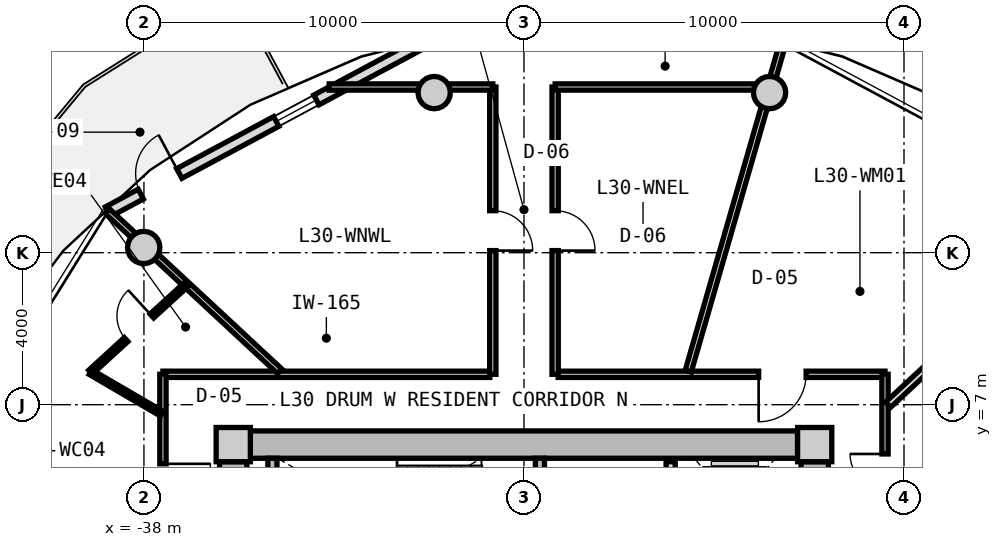
"""IFC4 building model, lengths in metres.
Left out: names, types, materials, properties, quantities, classifications, styles, units other than length and angle.
Written with IfcOpenShell. Run it as: python <this file> out.ifc"""

import sys

from ifc_helpers import new_model, si_unit, direction, frame, frame_2d, origin, origin_2d, place, context, subcontext, project, spatial, rectangle, circle, extrude, source, transform, mapped, element, fill, save


model = new_model("IFC4")
c1 = context("Model", 3, precision=1e-05, world=origin(), true_north=direction((0.0, 1.0)))
c2 = subcontext(c1, "Body", "Model", "MODEL_VIEW")
j1 = project(units=[si_unit("LENGTHUNIT", "METRE"), si_unit("PLANEANGLEUNIT", "RADIAN")], contexts=[c1])
p1 = place(None, origin())
s1 = spatial("IfcSite", under=j1, at=p1, CompositionType="ELEMENT")
p2 = place(p1, origin())
s2 = spatial("IfcBuilding", under=s1, at=p2, CompositionType="ELEMENT")
p3 = place(p2, frame((0.0, 0.0, 99.3)))
s3 = spatial("IfcBuildingStorey", under=s2, at=p3, CompositionType="ELEMENT", Elevation=99.3)
m1 = source(origin(), c2, "Body", "SweptSolid", [
    extrude(rectangle(XDim=0.9, YDim=0.9, at=origin_2d()), origin(), (0.0, 0.0, 1.0), 3.05),
])
for number, where, z_axis, x_axis in (
    (1, (-20.35, 5.95, 0.0), (0.0, 0.0, 1.0), (1.0, 0.0, 0.0)),
    (2, (-35.65, 5.95, 0.0), (0.0, 0.0, 1.0), (1.0, 0.0, 0.0)),
):
    element("IfcColumn", number, at=place(p3, frame(where, z_axis=z_axis, x_axis=x_axis)), inside=s3, PredefinedType="COLUMN", context=c2, shape_type="MappedRepresentation", body=[
        mapped(m1, transform((0.0, 0.0, 0.0), x_axis=(1.0, 0.0, 0.0), y_axis=(0.0, 1.0, 0.0), z_axis=(0.0, 0.0, 1.0), scale=1.0)),
    ])
m2 = source(origin(), c2, "Body", "SweptSolid", [
    extrude(rectangle(XDim=14.4, YDim=0.72, at=frame_2d((7.2, 0.0))), origin(), (0.0, 0.0, 1.0), 2.79),
])
p4 = place(p3, frame((-35.2, 5.95, 0.0), z_axis=(0.0, 0.0, 1.0), x_axis=(1.0, 0.0, 0.0)))
e3 = element("IfcWall", 3, at=p4, inside=s3, PredefinedType="SHEAR", context=c2, shape_type="MappedRepresentation", body=[
    mapped(m2, transform((0.0, 0.0, 0.0), x_axis=(1.0, 0.0, 0.0), y_axis=(0.0, 1.0, 0.0), z_axis=(0.0, 0.0, 1.0), scale=1.0)),
])
m3 = source(origin(), c2, "Body", "SweptSolid", [
    extrude(rectangle(XDim=11.0, YDim=0.72, at=frame_2d((5.5, 0.0))), origin(), (0.0, 0.0, 1.0), 2.79),
])
p5 = place(p3, frame((-35.65, -5.5, 0.0), z_axis=(0.0, 0.0, 1.0), x_axis=(0.0, 1.0, 0.0)))
e4 = element("IfcWall", 4, at=p5, inside=s3, PredefinedType="SHEAR", context=c2, shape_type="MappedRepresentation", body=[
    mapped(m3, transform((0.0, 0.0, 0.0), x_axis=(1.0, 0.0, 0.0), y_axis=(0.0, 1.0, 0.0), z_axis=(0.0, 0.0, 1.0), scale=1.0)),
])
p6 = place(p5, frame((3.8, 0.0, 0.0)))
e5 = element("IfcOpeningElement", 5, at=p6, cuts=e4, PredefinedType="OPENING", context=c2, shape_type="SweptSolid", body=[
    extrude(rectangle(XDim=1.2, YDim=2.15, at=frame_2d((0.6, 1.075))), frame((0.0, 0.37, 0.0), z_axis=(0.0, -1.0, 0.0), x_axis=(1.0, 0.0, 0.0)), (0.0, 0.0, 1.0), 0.74),
])
p7 = place(p3, frame((-20.35, 5.5, 0.0), z_axis=(0.0, 0.0, 1.0), x_axis=(0.0, -1.0, 0.0)))
e6 = element("IfcWall", 6, at=p7, inside=s3, PredefinedType="SHEAR", context=c2, shape_type="MappedRepresentation", body=[
    mapped(m3, transform((0.0, 0.0, 0.0), x_axis=(1.0, 0.0, 0.0), y_axis=(0.0, 1.0, 0.0), z_axis=(0.0, 0.0, 1.0), scale=1.0)),
])
p8 = place(p7, frame((5.65, 0.0, 0.0)))
e7 = element("IfcOpeningElement", 7, at=p8, cuts=e6, PredefinedType="OPENING", context=c2, shape_type="SweptSolid", body=[
    extrude(rectangle(XDim=1.2, YDim=2.15, at=frame_2d((0.6, 1.075))), frame((0.0, 0.37, 0.0), z_axis=(0.0, -1.0, 0.0), x_axis=(1.0, 0.0, 0.0)), (0.0, 0.0, 1.0), 0.74),
])
m4 = source(origin(), c2, "Body", "SweptSolid", [
    extrude(circle(Radius=0.425, at=origin_2d()), origin(), (0.0, 0.0, 1.0), 3.05),
])
for number, where, z_axis, x_axis in (
    (8, (-21.537, 15.213, 0.0), (0.0, 0.0, 1.0), (1.0, 0.0, 0.0)),
    (9, (-30.363, 15.213, 0.0), (0.0, 0.0, 1.0), (1.0, 0.0, 0.0)),
    (10, (-38.006, 11.137, 0.0), (0.0, 0.0, 1.0), (1.0, 0.0, 0.0)),
):
    element("IfcColumn", number, at=place(p3, frame(where, z_axis=z_axis, x_axis=x_axis)), inside=s3, PredefinedType="COLUMN", context=c2, shape_type="MappedRepresentation", body=[
        mapped(m4, transform((0.0, 0.0, 0.0), x_axis=(1.0, 0.0, 0.0), y_axis=(0.0, 1.0, 0.0), z_axis=(0.0, 0.0, 1.0), scale=1.0)),
    ])
m5 = source(origin(), c2, "Body", "SweptSolid", [
    extrude(rectangle(XDim=9.351, YDim=0.29, at=frame_2d((4.675, 0.0))), origin(), (0.0, 0.0, 1.0), 2.79),
])
p9 = place(p3, frame((-38.947, 12.077, 0.0), z_axis=(0.0, 0.0, 1.0), x_axis=(0.881184411073, 0.472772708267, 0.0)))
e11 = element("IfcWall", 11, at=p9, inside=s3, PredefinedType="SOLIDWALL", context=c2, shape_type="MappedRepresentation", body=[
    mapped(m5, transform((0.0, 0.0, 0.0), x_axis=(1.0, 0.0, 0.0), y_axis=(0.0, 1.0, 0.0), z_axis=(0.0, 0.0, 1.0), scale=1.0)),
])
p10 = place(p9, frame((0.98, 0.0, 0.0)))
e12 = element("IfcOpeningElement", 12, at=p10, cuts=e11, PredefinedType="OPENING", context=c2, shape_type="SweptSolid", body=[
    extrude(rectangle(XDim=1.15, YDim=2.25, at=frame_2d((0.575, 1.125))), frame((0.0, 0.155, 0.0), z_axis=(0.0, -1.0, 0.0), x_axis=(1.0, 0.0, 0.0)), (0.0, 0.0, 1.0), 0.31),
])
p11 = place(p9, frame((5.025, 0.0, 0.85)))
e13 = element("IfcOpeningElement", 13, at=p11, cuts=e11, PredefinedType="OPENING", context=c2, shape_type="SweptSolid", body=[
    extrude(rectangle(XDim=1.2, YDim=1.5, at=frame_2d((0.6, 0.75))), frame((0.0, 0.155, 0.0), z_axis=(0.0, -1.0, 0.0), x_axis=(1.0, 0.0, 0.0)), (0.0, 0.0, 1.0), 0.31),
])
m6 = source(origin(), c2, "Body", "SweptSolid", [
    extrude(rectangle(XDim=3.14, YDim=0.24, at=frame_2d((1.57, 0.0))), origin(), (0.0, 0.0, 1.0), 2.79),
])
p12 = place(p3, frame((-34.62, 2.45, 0.0), z_axis=(0.0, 0.0, 1.0), x_axis=(0.0, 1.0, 0.0)))
e14 = element("IfcWall", 14, at=p12, inside=s3, PredefinedType="PARTITIONING", context=c2, shape_type="MappedRepresentation", body=[
    mapped(m6, transform((0.0, 0.0, 0.0), x_axis=(1.0, 0.0, 0.0), y_axis=(0.0, 1.0, 0.0), z_axis=(0.0, 0.0, 1.0), scale=1.0)),
])
p13 = place(p3, frame((-27.58, 2.45, 0.0), z_axis=(0.0, 0.0, 1.0), x_axis=(0.0, 1.0, 0.0)))
e15 = element("IfcWall", 15, at=p13, inside=s3, PredefinedType="PARTITIONING", context=c2, shape_type="MappedRepresentation", body=[
    mapped(m6, transform((0.0, 0.0, 0.0), x_axis=(1.0, 0.0, 0.0), y_axis=(0.0, 1.0, 0.0), z_axis=(0.0, 0.0, 1.0), scale=1.0)),
])
p14 = place(p13, frame((0.55, 0.0, 0.0)))
e16 = element("IfcOpeningElement", 16, at=p14, cuts=e15, PredefinedType="OPENING", context=c2, shape_type="SweptSolid", body=[
    extrude(rectangle(XDim=1.1, YDim=2.15, at=frame_2d((0.55, 1.075))), frame((0.0, 0.13, 0.0), z_axis=(0.0, -1.0, 0.0), x_axis=(1.0, 0.0, 0.0)), (0.0, 0.0, 1.0), 0.26),
])
m7 = source(origin(), c2, "Body", "SweptSolid", [
    extrude(rectangle(XDim=5.0, YDim=0.24, at=frame_2d((2.5, 0.0))), origin(), (0.0, 0.0, 1.0), 2.775),
])
p15 = place(p3, frame((-24.14, 0.5, 0.0), z_axis=(0.0, 0.0, 1.0), x_axis=(0.0, 1.0, 0.0)))
e17 = element("IfcWall", 17, at=p15, inside=s3, PredefinedType="PARTITIONING", context=c2, shape_type="MappedRepresentation", body=[
    mapped(m7, transform((0.0, 0.0, 0.0), x_axis=(1.0, 0.0, 0.0), y_axis=(0.0, 1.0, 0.0), z_axis=(0.0, 0.0, 1.0), scale=1.0)),
])
p16 = place(p15, frame((3.05, 0.0, 0.0)))
e18 = element("IfcOpeningElement", 18, at=p16, cuts=e17, PredefinedType="OPENING", context=c2, shape_type="SweptSolid", body=[
    extrude(rectangle(XDim=1.3, YDim=2.2, at=frame_2d((0.65, 1.1))), frame((0.0, 0.13, 0.0), z_axis=(0.0, -1.0, 0.0), x_axis=(1.0, 0.0, 0.0)), (0.0, 0.0, 1.0), 0.26),
])
p17 = place(p15, frame((0.55, 0.0, 0.0)))
e19 = element("IfcOpeningElement", 19, at=p17, cuts=e17, PredefinedType="OPENING", context=c2, shape_type="SweptSolid", body=[
    extrude(rectangle(XDim=1.3, YDim=2.2, at=frame_2d((0.65, 1.1))), frame((0.0, 0.13, 0.0), z_axis=(0.0, -1.0, 0.0), x_axis=(1.0, 0.0, 0.0)), (0.0, 0.0, 1.0), 0.26),
])
m8 = source(origin(), c2, "Body", "SweptSolid", [
    extrude(rectangle(XDim=8.6, YDim=0.165, at=frame_2d((4.3, 0.0))), origin(), (0.0, 0.0, 1.0), 2.775),
])
p18 = place(p3, frame((-37.5, 7.8, 0.0), z_axis=(0.0, 0.0, 1.0), x_axis=(1.0, 0.0, 0.0)))
e20 = element("IfcWall", 20, at=p18, inside=s3, PredefinedType="PARTITIONING", context=c2, shape_type="MappedRepresentation", body=[
    mapped(m8, transform((0.0, 0.0, 0.0), x_axis=(1.0, 0.0, 0.0), y_axis=(0.0, 1.0, 0.0), z_axis=(0.0, 0.0, 1.0), scale=1.0)),
])
p19 = place(p3, frame((-27.1, 7.8, 0.0), z_axis=(0.0, 0.0, 1.0), x_axis=(1.0, 0.0, 0.0)))
e21 = element("IfcWall", 21, at=p19, inside=s3, PredefinedType="PARTITIONING", context=c2, shape_type="MappedRepresentation", body=[
    mapped(m8, transform((0.0, 0.0, 0.0), x_axis=(1.0, 0.0, 0.0), y_axis=(0.0, 1.0, 0.0), z_axis=(0.0, 0.0, 1.0), scale=1.0)),
])
p20 = place(p19, frame((5.275, 0.0, 0.0)))
e22 = element("IfcOpeningElement", 22, at=p20, cuts=e21, PredefinedType="OPENING", context=c2, shape_type="SweptSolid", body=[
    extrude(rectangle(XDim=1.25, YDim=2.2, at=frame_2d((0.625, 1.1))), frame((0.0, 0.093, 0.0), z_axis=(0.0, -1.0, 0.0), x_axis=(1.0, 0.0, 0.0)), (0.0, 0.0, 1.0), 0.185),
])
m9 = source(origin(), c2, "Body", "SweptSolid", [
    extrude(rectangle(XDim=15.6, YDim=0.165, at=frame_2d((7.8, 0.0))), origin(), (0.0, 0.0, 1.0), 2.775),
])
p21 = place(p3, frame((-37.5, -7.8, 0.0), z_axis=(0.0, 0.0, 1.0), x_axis=(0.0, 1.0, 0.0)))
e23 = element("IfcWall", 23, at=p21, inside=s3, PredefinedType="PARTITIONING", context=c2, shape_type="MappedRepresentation", body=[
    mapped(m9, transform((0.0, 0.0, 0.0), x_axis=(1.0, 0.0, 0.0), y_axis=(0.0, 1.0, 0.0), z_axis=(0.0, 0.0, 1.0), scale=1.0)),
])
p22 = place(p21, frame((11.994, 0.0, 0.0)))
e24 = element("IfcOpeningElement", 24, at=p22, cuts=e23, PredefinedType="OPENING", context=c2, shape_type="SweptSolid", body=[
    extrude(rectangle(XDim=1.25, YDim=2.2, at=frame_2d((0.625, 1.1))), frame((0.0, 0.093, 0.0), z_axis=(0.0, -1.0, 0.0), x_axis=(1.0, 0.0, 0.0)), (0.0, 0.0, 1.0), 0.185),
])
p23 = place(p21, frame((4.867, 0.0, 0.0)))
e25 = element("IfcOpeningElement", 25, at=p23, cuts=e23, PredefinedType="OPENING", context=c2, shape_type="SweptSolid", body=[
    extrude(rectangle(XDim=1.25, YDim=2.2, at=frame_2d((0.625, 1.1))), frame((0.0, 0.093, 0.0), z_axis=(0.0, -1.0, 0.0), x_axis=(1.0, 0.0, 0.0)), (0.0, 0.0, 1.0), 0.185),
])
p24 = place(p3, frame((-18.5, 7.8, 0.0), z_axis=(0.0, 0.0, 1.0), x_axis=(0.0, -1.0, 0.0)))
e26 = element("IfcWall", 26, at=p24, inside=s3, PredefinedType="PARTITIONING", context=c2, shape_type="MappedRepresentation", body=[
    mapped(m9, transform((0.0, 0.0, 0.0), x_axis=(1.0, 0.0, 0.0), y_axis=(0.0, 1.0, 0.0), z_axis=(0.0, 0.0, 1.0), scale=1.0)),
])
p25 = place(p24, frame((9.734, 0.0, 0.0)))
e27 = element("IfcOpeningElement", 27, at=p25, cuts=e26, PredefinedType="OPENING", context=c2, shape_type="SweptSolid", body=[
    extrude(rectangle(XDim=1.25, YDim=2.2, at=frame_2d((0.625, 1.1))), frame((0.0, 0.093, 0.0), z_axis=(0.0, -1.0, 0.0), x_axis=(1.0, 0.0, 0.0)), (0.0, 0.0, 1.0), 0.185),
])
p26 = place(p24, frame((4.739, 0.0, 0.0)))
e28 = element("IfcOpeningElement", 28, at=p26, cuts=e26, PredefinedType="OPENING", context=c2, shape_type="SweptSolid", body=[
    extrude(rectangle(XDim=0.92, YDim=2.1, at=frame_2d((0.46, 1.05))), frame((0.0, 0.093, 0.0), z_axis=(0.0, -1.0, 0.0), x_axis=(1.0, 0.0, 0.0)), (0.0, 0.0, 1.0), 0.185),
])
p27 = place(p24, frame((2.096, 0.0, 0.0)))
e29 = element("IfcOpeningElement", 29, at=p27, cuts=e26, PredefinedType="OPENING", context=c2, shape_type="SweptSolid", body=[
    extrude(rectangle(XDim=0.92, YDim=2.1, at=frame_2d((0.46, 1.05))), frame((0.0, 0.093, 0.0), z_axis=(0.0, -1.0, 0.0), x_axis=(1.0, 0.0, 0.0)), (0.0, 0.0, 1.0), 0.185),
])
m10 = source(origin(), c2, "Body", "SweptSolid", [
    extrude(rectangle(XDim=8.989, YDim=0.165, at=frame_2d((4.495, 0.0))), origin(), (0.0, 0.0, 1.0), 2.275),
])
p28 = place(p3, frame((-23.678, 7.88, 0.0), z_axis=(0.0, 0.0, 1.0), x_axis=(0.27702323008, 0.960863221274, 0.0)))
e30 = element("IfcWall", 30, at=p28, inside=s3, PredefinedType="PARTITIONING", context=c2, shape_type="MappedRepresentation", body=[
    mapped(m10, transform((0.0, 0.0, 0.0), x_axis=(1.0, 0.0, 0.0), y_axis=(0.0, 1.0, 0.0), z_axis=(0.0, 0.0, 1.0), scale=1.0)),
])
m11 = source(origin(), c2, "Body", "SweptSolid", [
    extrude(rectangle(XDim=6.187, YDim=0.165, at=frame_2d((3.093, 0.0))), origin(), (0.0, 0.0, 1.0), 2.275),
])
p29 = place(p3, frame((-34.429, 7.88, 0.0), z_axis=(0.0, 0.0, 1.0), x_axis=(-0.732501077882, 0.680765870841, 0.0)))
e31 = element("IfcWall", 31, at=p29, inside=s3, PredefinedType="PARTITIONING", context=c2, shape_type="MappedRepresentation", body=[
    mapped(m11, transform((0.0, 0.0, 0.0), x_axis=(1.0, 0.0, 0.0), y_axis=(0.0, 1.0, 0.0), z_axis=(0.0, 0.0, 1.0), scale=1.0)),
])
m12 = source(origin(), c2, "Body", "SweptSolid", [
    extrude(rectangle(XDim=7.56, YDim=0.165, at=frame_2d((3.78, 0.0))), origin(), (0.0, 0.0, 1.0), 2.775),
])
p30 = place(p3, frame((-28.82, 7.8, 0.0), z_axis=(0.0, 0.0, 1.0), x_axis=(0.0, 1.0, 0.0)))
e32 = element("IfcWall", 32, at=p30, inside=s3, PredefinedType="PARTITIONING", context=c2, shape_type="MappedRepresentation", body=[
    mapped(m12, transform((0.0, 0.0, 0.0), x_axis=(1.0, 0.0, 0.0), y_axis=(0.0, 1.0, 0.0), z_axis=(0.0, 0.0, 1.0), scale=1.0)),
])
p31 = place(p30, frame((3.255, 0.0, 0.0)))
e33 = element("IfcOpeningElement", 33, at=p31, cuts=e32, PredefinedType="OPENING", context=c2, shape_type="SweptSolid", body=[
    extrude(rectangle(XDim=1.05, YDim=2.15, at=frame_2d((0.525, 1.075))), frame((0.0, 0.093, 0.0), z_axis=(0.0, -1.0, 0.0), x_axis=(1.0, 0.0, 0.0)), (0.0, 0.0, 1.0), 0.185),
])
m13 = source(origin(), c2, "Body", "SweptSolid", [
    extrude(rectangle(XDim=4.307, YDim=0.165, at=frame_2d((2.153, 0.0))), origin(), (0.0, 0.0, 1.0), 2.275),
])
p32 = place(p3, frame((-33.127, 15.36, 0.0), z_axis=(0.0, 0.0, 1.0), x_axis=(1.0, 0.0, 0.0)))
e34 = element("IfcWall", 34, at=p32, inside=s3, PredefinedType="PARTITIONING", context=c2, shape_type="MappedRepresentation", body=[
    mapped(m13, transform((0.0, 0.0, 0.0), x_axis=(1.0, 0.0, 0.0), y_axis=(0.0, 1.0, 0.0), z_axis=(0.0, 0.0, 1.0), scale=1.0)),
])
p33 = place(p3, frame((-27.18, 7.8, 0.0), z_axis=(0.0, 0.0, 1.0), x_axis=(0.0, 1.0, 0.0)))
e35 = element("IfcWall", 35, at=p33, inside=s3, PredefinedType="PARTITIONING", context=c2, shape_type="MappedRepresentation", body=[
    mapped(m12, transform((0.0, 0.0, 0.0), x_axis=(1.0, 0.0, 0.0), y_axis=(0.0, 1.0, 0.0), z_axis=(0.0, 0.0, 1.0), scale=1.0)),
])
p34 = place(p33, frame((3.255, 0.0, 0.0)))
e36 = element("IfcOpeningElement", 36, at=p34, cuts=e35, PredefinedType="OPENING", context=c2, shape_type="SweptSolid", body=[
    extrude(rectangle(XDim=1.05, YDim=2.15, at=frame_2d((0.525, 1.075))), frame((0.0, 0.093, 0.0), z_axis=(0.0, -1.0, 0.0), x_axis=(1.0, 0.0, 0.0)), (0.0, 0.0, 1.0), 0.185),
])
m14 = source(origin(), c2, "Body", "SweptSolid", [
    extrude(rectangle(XDim=5.814, YDim=0.165, at=frame_2d((2.907, 0.0))), origin(), (0.0, 0.0, 1.0), 2.275),
])
p35 = place(p3, frame((-27.18, 15.36, 0.0), z_axis=(0.0, 0.0, 1.0), x_axis=(1.0, 0.0, 0.0)))
e37 = element("IfcWall", 37, at=p35, inside=s3, PredefinedType="PARTITIONING", context=c2, shape_type="MappedRepresentation", body=[
    mapped(m14, transform((0.0, 0.0, 0.0), x_axis=(1.0, 0.0, 0.0), y_axis=(0.0, 1.0, 0.0), z_axis=(0.0, 0.0, 1.0), scale=1.0)),
])
m15 = source(origin(), c2, "Body", "SweptSolid", [
    extrude(rectangle(XDim=2.172, YDim=0.14, at=frame_2d((1.086, 0.0))), origin(), (0.0, 0.0, 1.0), 2.775),
])
p36 = place(p3, frame((-37.53, 6.762, 0.0), z_axis=(0.0, 0.0, 1.0), x_axis=(-0.863562702562, 0.504241468688, 0.0)))
e38 = element("IfcWall", 38, at=p36, inside=s3, PredefinedType="PARTITIONING", context=c2, shape_type="MappedRepresentation", body=[
    mapped(m15, transform((0.0, 0.0, 0.0), x_axis=(1.0, 0.0, 0.0), y_axis=(0.0, 1.0, 0.0), z_axis=(0.0, 0.0, 1.0), scale=1.0)),
])
m16 = source(origin(), c2, "Body", "SweptSolid", [
    extrude(rectangle(XDim=3.457, YDim=0.14, at=frame_2d((1.729, 0.0))), origin(), (0.0, 0.0, 1.0), 2.775),
])
p37 = place(p3, frame((-39.405, 7.857, 0.0), z_axis=(0.0, 0.0, 1.0), x_axis=(0.737567375492, 0.675273549467, 0.0)))
e39 = element("IfcWall", 39, at=p37, inside=s3, PredefinedType="PARTITIONING", context=c2, shape_type="MappedRepresentation", body=[
    mapped(m16, transform((0.0, 0.0, 0.0), x_axis=(1.0, 0.0, 0.0), y_axis=(0.0, 1.0, 0.0), z_axis=(0.0, 0.0, 1.0), scale=1.0)),
])
p38 = place(p37, frame((1.268, 0.0, 0.0)))
e40 = element("IfcOpeningElement", 40, at=p38, cuts=e39, PredefinedType="OPENING", context=c2, shape_type="SweptSolid", body=[
    extrude(rectangle(XDim=0.92, YDim=2.1, at=frame_2d((0.46, 1.05))), frame((0.0, 0.08, 0.0), z_axis=(0.0, -1.0, 0.0), x_axis=(1.0, 0.0, 0.0)), (0.0, 0.0, 1.0), 0.16),
])
m17 = source(origin(), c2, "Body", "SweptSolid", [
    extrude(rectangle(XDim=7.482, YDim=0.19, at=frame_2d((3.741, 0.0))), origin(), (0.0, 0.0, 1.0), 2.275),
])
p39 = place(p3, frame((-18.42, 6.998, 0.0), z_axis=(0.0, 0.0, 1.0), x_axis=(0.732508698043, 0.680757671489, 0.0)))
e41 = element("IfcWall", 41, at=p39, inside=s3, PredefinedType="PARTITIONING", context=c2, shape_type="MappedRepresentation", body=[
    mapped(m17, transform((0.0, 0.0, 0.0), x_axis=(1.0, 0.0, 0.0), y_axis=(0.0, 1.0, 0.0), z_axis=(0.0, 0.0, 1.0), scale=1.0)),
])
m18 = source(origin(), c2, "Body", "SweptSolid", [
    extrude(rectangle(XDim=9.447, YDim=0.14, at=frame_2d((4.724, 0.0))), origin(), (0.0, 0.0, 1.0), 2.775),
])
p40 = place(p3, frame((-18.47, 3.289, 0.0), z_axis=(0.0, 0.0, 1.0), x_axis=(0.918162367414, 0.396204324894, 0.0)))
e42 = element("IfcWall", 42, at=p40, inside=s3, PredefinedType="PARTITIONING", context=c2, shape_type="MappedRepresentation", body=[
    mapped(m18, transform((0.0, 0.0, 0.0), x_axis=(1.0, 0.0, 0.0), y_axis=(0.0, 1.0, 0.0), z_axis=(0.0, 0.0, 1.0), scale=1.0)),
])
m19 = source(origin(), c2, "Body", "SweptSolid", [
    extrude(rectangle(XDim=1.15, YDim=2.25, at=frame_2d((0.575, 1.125))), frame((0.0, 0.025, 0.0), z_axis=(0.0, -1.0, 0.0), x_axis=(1.0, 0.0, 0.0)), (0.0, 0.0, 1.0), 0.05),
])
p41 = place(p10, origin())
e43 = element("IfcDoor", 43, at=p41, inside=s3, OperationType="SINGLE_SWING_RIGHT", PredefinedType="DOOR", context=c2, shape_type="MappedRepresentation", body=[
    mapped(m19, transform((0.0, 0.0, 0.0), x_axis=(1.0, 0.0, 0.0), y_axis=(0.0, 1.0, 0.0), z_axis=(0.0, 0.0, 1.0), scale=1.0)),
])
fill(e12, e43)
m20 = source(origin(), c2, "Body", "SweptSolid", [
    extrude(rectangle(XDim=1.2, YDim=1.5, at=frame_2d((0.6, 0.75))), frame((0.0, 0.03, 0.0), z_axis=(0.0, -1.0, 0.0), x_axis=(1.0, 0.0, 0.0)), (0.0, 0.0, 1.0), 0.06),
])
p42 = place(p11, origin())
e44 = element("IfcWindow", 44, at=p42, inside=s3, PartitioningType="SINGLE_PANEL", PredefinedType="WINDOW", context=c2, shape_type="MappedRepresentation", body=[
    mapped(m20, transform((0.0, 0.0, 0.0), x_axis=(1.0, 0.0, 0.0), y_axis=(0.0, 1.0, 0.0), z_axis=(0.0, 0.0, 1.0), scale=1.0)),
])
fill(e13, e44)
m21 = source(origin(), c2, "Body", "SweptSolid", [
    extrude(rectangle(XDim=1.05, YDim=2.15, at=frame_2d((0.525, 1.075))), frame((0.0, 0.025, 0.0), z_axis=(0.0, -1.0, 0.0), x_axis=(1.0, 0.0, 0.0)), (0.0, 0.0, 1.0), 0.05),
])
p43 = place(p31, frame((1.05, 0.0, 0.0), z_axis=(0.0, 0.0, 1.0), x_axis=(-1.0, 0.0, 0.0)))
e45 = element("IfcDoor", 45, at=p43, inside=s3, OperationType="SINGLE_SWING_RIGHT", PredefinedType="DOOR", context=c2, shape_type="MappedRepresentation", body=[
    mapped(m21, transform((0.0, 0.0, 0.0), x_axis=(1.0, 0.0, 0.0), y_axis=(0.0, 1.0, 0.0), z_axis=(0.0, 0.0, 1.0), scale=1.0)),
])
fill(e33, e45)
p44 = place(p34, frame((1.05, 0.0, 0.0), z_axis=(0.0, 0.0, 1.0), x_axis=(-1.0, 0.0, 0.0)))
e46 = element("IfcDoor", 46, at=p44, inside=s3, OperationType="SINGLE_SWING_RIGHT", PredefinedType="DOOR", context=c2, shape_type="MappedRepresentation", body=[
    mapped(m21, transform((0.0, 0.0, 0.0), x_axis=(1.0, 0.0, 0.0), y_axis=(0.0, 1.0, 0.0), z_axis=(0.0, 0.0, 1.0), scale=1.0)),
])
fill(e36, e46)
m22 = source(origin(), c2, "Body", "SweptSolid", [
    extrude(rectangle(XDim=1.25, YDim=2.2, at=frame_2d((0.625, 1.1))), frame((0.0, 0.025, 0.0), z_axis=(0.0, -1.0, 0.0), x_axis=(1.0, 0.0, 0.0)), (0.0, 0.0, 1.0), 0.05),
])
p45 = place(p22, frame((1.25, 0.0, 0.0), z_axis=(0.0, 0.0, 1.0), x_axis=(-1.0, 0.0, 0.0)))
e47 = element("IfcDoor", 47, at=p45, inside=s3, OperationType="SINGLE_SWING_LEFT", PredefinedType="DOOR", context=c2, shape_type="MappedRepresentation", body=[
    mapped(m22, transform((0.0, 0.0, 0.0), x_axis=(1.0, 0.0, 0.0), y_axis=(0.0, 1.0, 0.0), z_axis=(0.0, 0.0, 1.0), scale=1.0)),
])
fill(e24, e47)
m23 = source(origin(), c2, "Body", "SweptSolid", [
    extrude(rectangle(XDim=0.92, YDim=2.1, at=frame_2d((0.46, 1.05))), frame((0.0, 0.025, 0.0), z_axis=(0.0, -1.0, 0.0), x_axis=(1.0, 0.0, 0.0)), (0.0, 0.0, 1.0), 0.05),
])
p46 = place(p38, origin())
e48 = element("IfcDoor", 48, at=p46, inside=s3, OperationType="SINGLE_SWING_RIGHT", PredefinedType="DOOR", context=c2, shape_type="MappedRepresentation", body=[
    mapped(m23, transform((0.0, 0.0, 0.0), x_axis=(1.0, 0.0, 0.0), y_axis=(0.0, 1.0, 0.0), z_axis=(0.0, 0.0, 1.0), scale=1.0)),
])
fill(e40, e48)
p47 = place(p27, frame((0.92, 0.0, 0.0), z_axis=(0.0, 0.0, 1.0), x_axis=(-1.0, 0.0, 0.0)))
e49 = element("IfcDoor", 49, at=p47, inside=s3, OperationType="SINGLE_SWING_RIGHT", PredefinedType="DOOR", context=c2, shape_type="MappedRepresentation", body=[
    mapped(m23, transform((0.0, 0.0, 0.0), x_axis=(1.0, 0.0, 0.0), y_axis=(0.0, 1.0, 0.0), z_axis=(0.0, 0.0, 1.0), scale=1.0)),
])
fill(e29, e49)
p48 = place(p20, frame((1.25, 0.0, 0.0), z_axis=(0.0, 0.0, 1.0), x_axis=(-1.0, 0.0, 0.0)))
e50 = element("IfcDoor", 50, at=p48, inside=s3, OperationType="SINGLE_SWING_RIGHT", PredefinedType="DOOR", context=c2, shape_type="MappedRepresentation", body=[
    mapped(m22, transform((0.0, 0.0, 0.0), x_axis=(1.0, 0.0, 0.0), y_axis=(0.0, 1.0, 0.0), z_axis=(0.0, 0.0, 1.0), scale=1.0)),
])
fill(e22, e50)
save(model, sys.argv[1])
